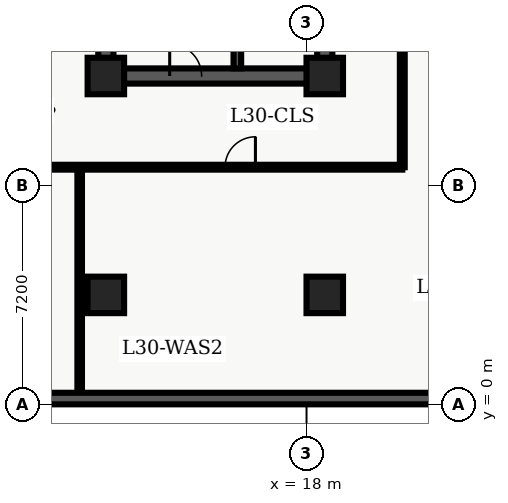
"""IFC4 building model, lengths in metres.
Left out: names, types, materials, properties, quantities, classifications, styles, units other than length and angle.
Written with IfcOpenShell. Run it as: python <this file> out.ifc"""

import sys

from ifc_helpers import new_model, entity, si_unit, converted_unit, direction, frame, origin_with_axes, origin_2d_with_axis, place, context, subcontext, project, spatial, polyline, rectangle, outline, extrude, element, fill, save


model = new_model("IFC4")
c1 = context("Model", 3, precision=1e-05, world=origin_with_axes(), true_north=direction((0.0, 1.0)))
c2 = subcontext(c1, "Body", "Model", "MODEL_VIEW")
j1 = project(units=[si_unit("LENGTHUNIT", "METRE"), converted_unit("PLANEANGLEUNIT", "DEGREE", entity("IfcPlaneAngleMeasure", 0.017), si_unit("PLANEANGLEUNIT", "RADIAN"), dimensions=[0, 0, 0, 0, 0, 0, 0])], contexts=[c1])
p1 = place(None, origin_with_axes())
s1 = spatial("IfcSite", under=j1, at=p1, CompositionType="ELEMENT")
p2 = place(p1, origin_with_axes())
s2 = spatial("IfcBuilding", under=s1, at=p2, CompositionType="ELEMENT")
p3 = place(p2, frame((0.0, 0.0, 124.2), z_axis=(0.0, 0.0, 1.0), x_axis=(1.0, 0.0, 0.0)))
s3 = spatial("IfcBuildingStorey", under=s2, at=p3, CompositionType="ELEMENT", Elevation=124.2)
p4 = place(p3, frame((11.4, 10.8, 0.0), z_axis=(0.0, 0.0, 1.0), x_axis=(0.0, 1.0, 0.0)))
e1 = element("IfcWall", 1, at=p4, inside=s3, PredefinedType="SHEAR", context=c2, shape_type="SweptSolid", body=[
    extrude(outline(polyline([(0.0, -0.25), (27.0, -0.25), (27.0, 0.25), (0.0, 0.25), (0.0, -0.25)])), origin_with_axes(), (0.0, 0.0, 1.0), 4.56),
])
p5 = place(p3, frame((11.4, 10.8, 0.0), z_axis=(0.0, 0.0, 1.0), x_axis=(1.0, 0.0, 0.0)))
e2 = element("IfcWall", 2, at=p5, inside=s3, PredefinedType="SHEAR", context=c2, shape_type="SweptSolid", body=[
    extrude(outline(polyline([(0.0, -0.25), (7.2, -0.25), (7.2, 0.25), (0.0, 0.25), (0.0, -0.25)])), origin_with_axes(), (0.0, 0.0, 1.0), 4.56),
])
p6 = place(p5, frame((2.625, 0.0, 0.0), z_axis=(0.0, 0.0, 1.0), x_axis=(1.0, 0.0, 0.0)))
e3 = element("IfcOpeningElement", 3, at=p6, cuts=e2, PredefinedType="OPENING", context=c2, shape_type="SweptSolid", body=[
    extrude(rectangle(XDim=1.05, YDim=0.52, at=origin_2d_with_axis()), origin_with_axes(), (0.0, 0.0, 1.0), 2.15),
])
p7 = place(p3, frame((18.6, 10.8, 0.0), z_axis=(0.0, 0.0, 1.0), x_axis=(0.0, 1.0, 0.0)))
e4 = element("IfcWall", 4, at=p7, inside=s3, PredefinedType="SHEAR", context=c2, shape_type="SweptSolid", body=[
    extrude(outline(polyline([(0.0, -0.25), (13.5, -0.25), (13.5, 0.25), (0.0, 0.25), (0.0, -0.25)])), origin_with_axes(), (0.0, 0.0, 1.0), 4.56),
])
p8 = place(p7, frame((5.6, 0.0, 0.0), z_axis=(0.0, 0.0, 1.0), x_axis=(1.0, 0.0, 0.0)))
e5 = element("IfcOpeningElement", 5, at=p8, cuts=e4, PredefinedType="OPENING", context=c2, shape_type="SweptSolid", body=[
    extrude(rectangle(XDim=1.1, YDim=0.52, at=origin_2d_with_axis()), origin_with_axes(), (0.0, 0.0, 1.0), 2.15),
])
p9 = place(p7, frame((7.8, 0.0, 0.0), z_axis=(0.0, 0.0, 1.0), x_axis=(1.0, 0.0, 0.0)))
e6 = element("IfcOpeningElement", 6, at=p9, cuts=e4, PredefinedType="OPENING", context=c2, shape_type="SweptSolid", body=[
    extrude(rectangle(XDim=1.1, YDim=0.52, at=origin_2d_with_axis()), origin_with_axes(), (0.0, 0.0, 1.0), 2.15),
])
p10 = place(p7, frame((11.125, 0.0, 0.0), z_axis=(0.0, 0.0, 1.0), x_axis=(1.0, 0.0, 0.0)))
e7 = element("IfcOpeningElement", 7, at=p10, cuts=e4, PredefinedType="OPENING", context=c2, shape_type="SweptSolid", body=[
    extrude(rectangle(XDim=1.05, YDim=0.52, at=origin_2d_with_axis()), origin_with_axes(), (0.0, 0.0, 1.0), 2.15),
])
p11 = place(p7, frame((2.425, 0.0, 0.0), z_axis=(0.0, 0.0, 1.0), x_axis=(1.0, 0.0, 0.0)))
e8 = element("IfcOpeningElement", 8, at=p11, cuts=e4, PredefinedType="OPENING", context=c2, shape_type="SweptSolid", body=[
    extrude(rectangle(XDim=1.05, YDim=0.52, at=origin_2d_with_axis()), origin_with_axes(), (0.0, 0.0, 1.0), 2.15),
])
p12 = place(p3, frame((15.725, 11.05, 0.0), z_axis=(0.0, 0.0, 1.0), x_axis=(0.0, 1.0, 0.0)))
e9 = element("IfcWall", 9, at=p12, inside=s3, PredefinedType="SHEAR", context=c2, shape_type="SweptSolid", body=[
    extrude(outline(polyline([(0.0, -0.125), (8.65, -0.125), (8.65, 0.125), (0.0, 0.125), (0.0, -0.125)])), origin_with_axes(), (0.0, 0.0, 1.0), 4.56),
])
for number, where, z_axis, x_axis in (
    (10, (11.4, 3.6, 0.0), (0.0, 0.0, 1.0), (1.0, 0.0, 0.0)),
    (11, (11.4, 10.8, 0.0), (0.0, 0.0, 1.0), (1.0, 0.0, 0.0)),
    (12, (18.6, 3.6, 0.0), (0.0, 0.0, 1.0), (1.0, 0.0, 0.0)),
    (13, (18.6, 10.8, 0.0), (0.0, 0.0, 1.0), (1.0, 0.0, 0.0)),
):
    element("IfcColumn", number, at=place(p3, frame(where, z_axis=z_axis, x_axis=x_axis)), inside=s3, PredefinedType="COLUMN", context=c2, shape_type="SweptSolid", body=[
        extrude(rectangle(XDim=1.2, YDim=1.2, at=origin_2d_with_axis()), origin_with_axes(), (0.0, 0.0, 1.0), 4.8),
    ])
p13 = place(p3, frame((2.6, 7.8, 0.0), z_axis=(0.0, 0.0, 1.0), x_axis=(1.0, 0.0, 0.0)))
e14 = element("IfcWall", 14, at=p13, inside=s3, PredefinedType="PARTITIONING", context=c2, shape_type="SweptSolid", body=[
    extrude(outline(polyline([(0.0, -0.08), (18.55, -0.08), (18.55, 0.08), (0.0, 0.08), (0.0, -0.08)])), origin_with_axes(), (0.0, 0.0, 1.0), 3.2),
])
p14 = place(p13, frame((3.684, 0.0, 0.0), z_axis=(0.0, 0.0, 1.0), x_axis=(1.0, 0.0, 0.0)))
e15 = element("IfcOpeningElement", 15, at=p14, cuts=e14, PredefinedType="OPENING", context=c2, shape_type="SweptSolid", body=[
    extrude(rectangle(XDim=1.0, YDim=0.18, at=origin_2d_with_axis()), origin_with_axes(), (0.0, 0.0, 1.0), 2.15),
])
p15 = place(p13, frame((13.22, 0.0, 0.0), z_axis=(0.0, 0.0, 1.0), x_axis=(1.0, 0.0, 0.0)))
e16 = element("IfcOpeningElement", 16, at=p15, cuts=e14, PredefinedType="OPENING", context=c2, shape_type="SweptSolid", body=[
    extrude(rectangle(XDim=1.0, YDim=0.18, at=origin_2d_with_axis()), origin_with_axes(), (0.0, 0.0, 1.0), 2.15),
])
p16 = place(p3, frame((21.15, 7.8, 0.0), z_axis=(0.0, 0.0, 1.0), x_axis=(0.0, 1.0, 0.0)))
e17 = element("IfcWall", 17, at=p16, inside=s3, PredefinedType="PARTITIONING", context=c2, shape_type="SweptSolid", body=[
    extrude(outline(polyline([(0.0, -0.08), (32.7, -0.08), (32.7, 0.08), (0.0, 0.08), (0.0, -0.08)])), origin_with_axes(), (0.0, 0.0, 1.0), 3.2),
])
p17 = place(p16, frame((5.775, 0.0, 0.0), z_axis=(0.0, 0.0, 1.0), x_axis=(1.0, 0.0, 0.0)))
e18 = element("IfcOpeningElement", 18, at=p17, cuts=e17, PredefinedType="OPENING", context=c2, shape_type="SweptSolid", body=[
    extrude(rectangle(XDim=1.05, YDim=0.18, at=origin_2d_with_axis()), origin_with_axes(), (0.0, 0.0, 1.0), 2.15),
])
p18 = place(p3, frame((10.539, 0.36, 0.0), z_axis=(0.0, 0.0, 1.0), x_axis=(0.0, 1.0, 0.0)))
e19 = element("IfcWall", 19, at=p18, inside=s3, PredefinedType="PARTITIONING", context=c2, shape_type="SweptSolid", body=[
    extrude(outline(polyline([(0.0, -0.075), (7.34, -0.075), (7.34, 0.075), (0.0, 0.075), (0.0, -0.075)])), origin_with_axes(), (0.0, 0.0, 1.0), 3.2),
])
p19 = place(p3, frame((57.22, 0.19, 0.0), z_axis=(0.0, 0.0, 1.0), x_axis=(-1.0, 0.0, 0.0)))
e20 = element("IfcWall", 20, at=p19, inside=s3, PredefinedType="SOLIDWALL", context=c2, shape_type="SweptSolid", body=[
    extrude(outline(polyline([(0.0, -0.19), (54.82, -0.19), (54.82, 0.19), (0.0, 0.19), (0.0, -0.19)])), origin_with_axes(), (0.0, 0.0, 1.0), 4.56),
])
p20 = place(p5, frame((2.625, 0.0, 0.0), z_axis=(0.0, 0.0, 1.0), x_axis=(1.0, 0.0, 0.0)))
e21 = element("IfcDoor", 21, at=p20, inside=s3, OperationType="SINGLE_SWING_LEFT", PredefinedType="DOOR", context=c2, shape_type="SweptSolid", body=[
    extrude(rectangle(XDim=1.05, YDim=0.09, at=origin_2d_with_axis()), origin_with_axes(), (0.0, 0.0, 1.0), 2.15),
])
fill(e3, e21)
p21 = place(p13, frame((13.22, 0.0, 0.0), z_axis=(0.0, 0.0, 1.0), x_axis=(1.0, 0.0, 0.0)))
e22 = element("IfcDoor", 22, at=p21, inside=s3, OperationType="SINGLE_SWING_RIGHT", PredefinedType="DOOR", context=c2, shape_type="SweptSolid", body=[
    extrude(rectangle(XDim=1.0, YDim=0.09, at=origin_2d_with_axis()), origin_with_axes(), (0.0, 0.0, 1.0), 2.15),
])
fill(e16, e22)
save(model, sys.argv[1])
